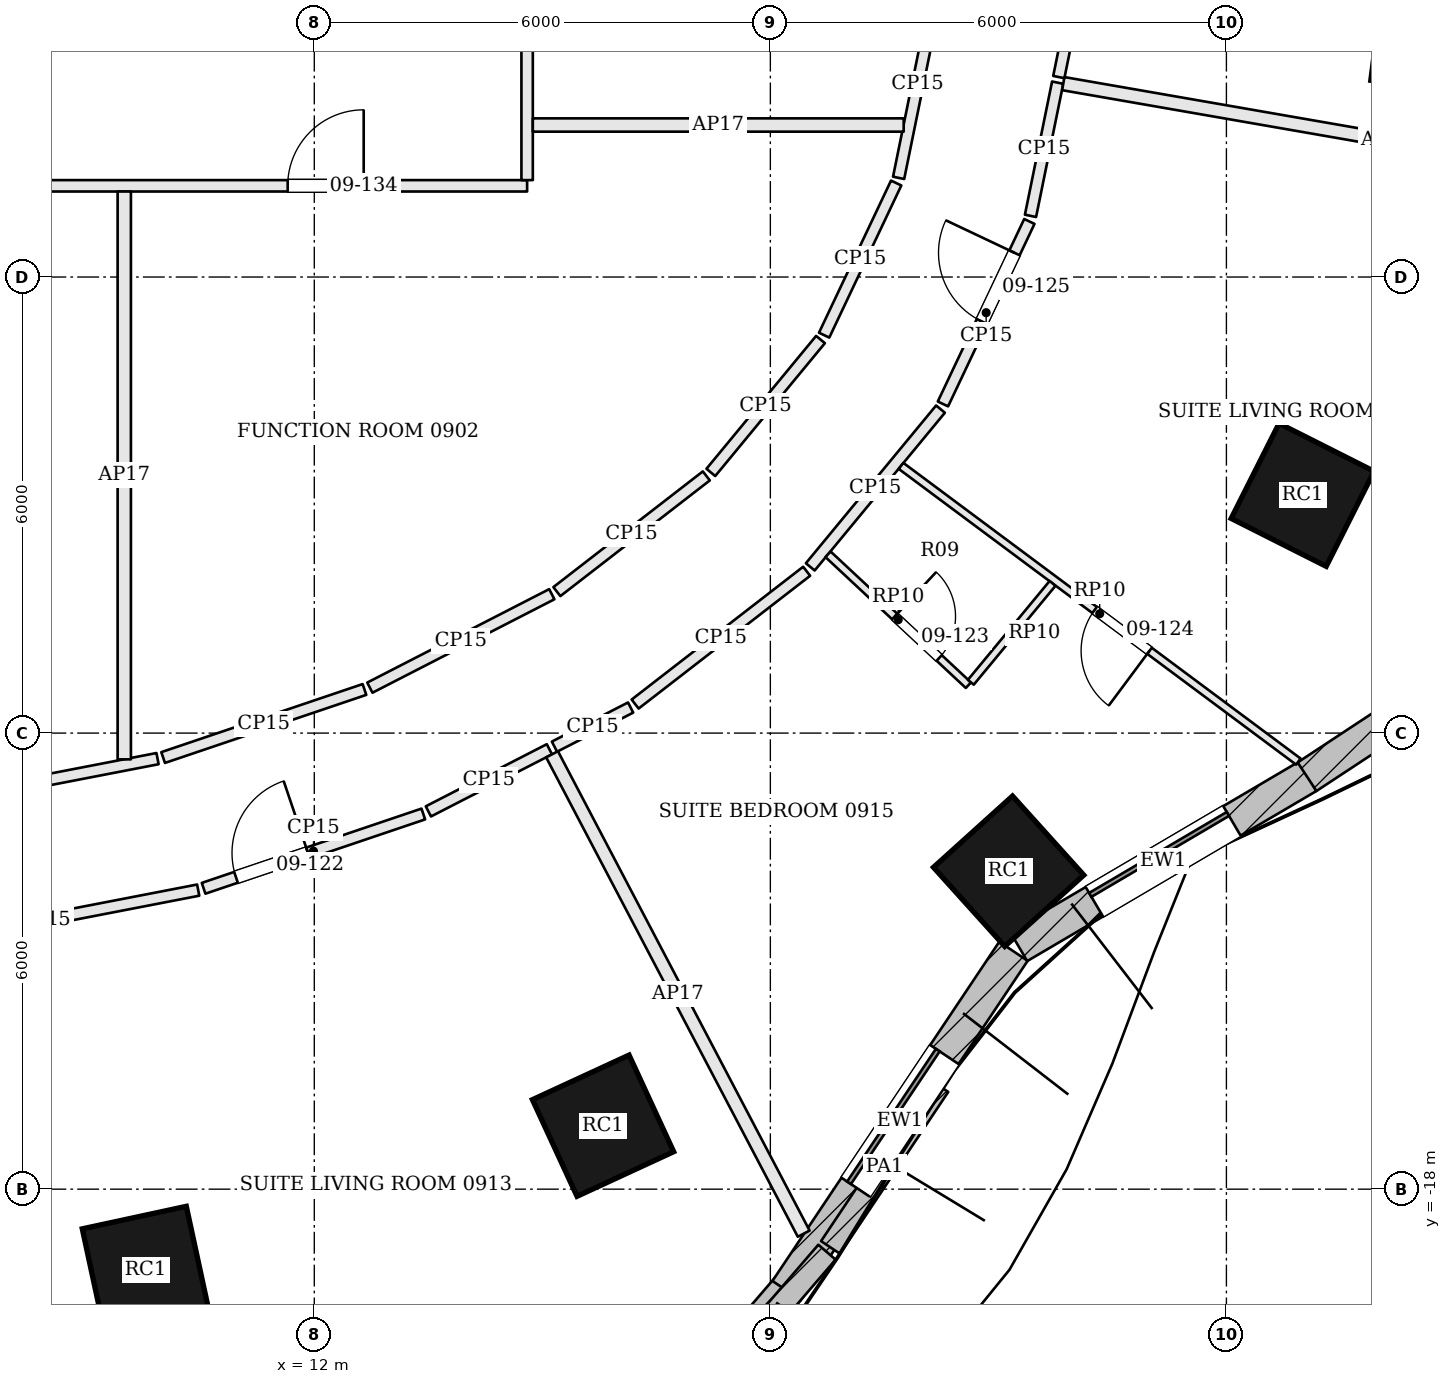
"""IFC4 building model, lengths in metres.
Left out: names, types, materials, properties, quantities, classifications, styles, units other than length and angle.
Written with IfcOpenShell. Run it as: python <this file> out.ifc"""

import sys

from ifc_helpers import new_model, si_unit, direction, frame, frame_2d, origin, origin_2d, place, context, subcontext, project, spatial, rectangle, extrude, element, fill, save


model = new_model("IFC4")
c1 = context("Model", 3, precision=1e-05, world=origin(), true_north=direction((0.0, 1.0)))
c2 = subcontext(c1, "Body", "Model", "MODEL_VIEW")
j1 = project(units=[si_unit("LENGTHUNIT", "METRE"), si_unit("PLANEANGLEUNIT", "RADIAN")], contexts=[c1])
p1 = place(None, origin())
s1 = spatial("IfcSite", under=j1, at=p1, CompositionType="ELEMENT")
p2 = place(p1, origin())
s2 = spatial("IfcBuilding", under=s1, at=p2, CompositionType="ELEMENT")
p3 = place(p2, frame((0.0, 0.0, 48.3)))
s3 = spatial("IfcBuildingStorey", under=s2, at=p3, CompositionType="ELEMENT", Elevation=48.3)
for number, where, z_axis, x_axis in (
    (1, (9.78, -19.058, 0.0), (0.0, 0.0, 1.0), (0.977, 0.211, 0.0)),
    (2, (15.799, -17.165, 0.0), (0.0, 0.0, 1.0), (0.908, 0.419, 0.0)),
    (3, (21.135, -13.817, 0.0), (0.0, 0.0, 1.0), (0.743, 0.67, 0.0)),
    (4, (25.003, -8.866, 0.0), (0.0, 0.0, 1.0), (0.45, 0.893, 0.0)),
    (5, (26.684, -2.808, 0.0), (0.0, 0.0, 1.0), (0.128, 0.992, 0.0)),
):
    element("IfcColumn", number, at=place(p3, frame(where, z_axis=z_axis, x_axis=x_axis)), inside=s3, PredefinedType="COLUMN", context=c2, shape_type="SweptSolid", body=[
        extrude(rectangle(XDim=1.4, YDim=1.4, at=origin_2d()), origin(), (0.0, 0.0, 1.0), 3.6),
    ])
p4 = place(p3, frame((15.919, -21.999, 0.0), z_axis=(0.0, 0.0, 1.0), x_axis=(0.652009971272, 0.758210391225, 0.0)))
e6 = element("IfcWall", 6, at=p4, inside=s3, PredefinedType="SOLIDWALL", context=c2, shape_type="SweptSolid", body=[
    extrude(rectangle(XDim=3.545, YDim=0.45, at=frame_2d((1.772, 0.0))), origin(), (0.0, 0.0, 1.0), 3.4),
])
p5 = place(p4, frame((0.722, 0.0, 0.9)))
e7 = element("IfcOpeningElement", 7, at=p5, cuts=e6, PredefinedType="OPENING", context=c2, shape_type="SweptSolid", body=[
    extrude(rectangle(XDim=2.1, YDim=2.0, at=frame_2d((1.05, 1.0))), frame((0.0, 0.235, 0.0), z_axis=(0.0, -1.0, 0.0), x_axis=(1.0, 0.0, 0.0)), (0.0, 0.0, 1.0), 0.47),
])
p6 = place(p3, frame((18.214, -19.333, 0.0), z_axis=(0.0, 0.0, 1.0), x_axis=(0.555833135316, 0.831293886471, 0.0)))
e8 = element("IfcWall", 8, at=p6, inside=s3, PredefinedType="SOLIDWALL", context=c2, shape_type="SweptSolid", body=[
    extrude(rectangle(XDim=5.368, YDim=0.45, at=frame_2d((2.684, 0.0))), origin(), (0.0, 0.0, 1.0), 3.4),
])
p7 = place(p6, frame((1.634, 0.0, 0.9)))
e9 = element("IfcOpeningElement", 9, at=p7, cuts=e8, PredefinedType="OPENING", context=c2, shape_type="SweptSolid", body=[
    extrude(rectangle(XDim=2.1, YDim=2.0, at=frame_2d((1.05, 1.0))), frame((0.0, 0.235, 0.0), z_axis=(0.0, -1.0, 0.0), x_axis=(1.0, 0.0, 0.0)), (0.0, 0.0, 1.0), 0.47),
])
p8 = place(p3, frame((21.266, -14.805, 0.0), z_axis=(0.0, 0.0, 1.0), x_axis=(0.861975457737, 0.506950007653, 0.0)))
e10 = element("IfcWall", 10, at=p8, inside=s3, PredefinedType="SOLIDWALL", context=c2, shape_type="SweptSolid", body=[
    extrude(rectangle(XDim=4.413, YDim=0.45, at=frame_2d((2.207, 0.0))), origin(), (0.0, 0.0, 1.0), 3.4),
])
p9 = place(p8, frame((1.156, 0.0, 0.9)))
e11 = element("IfcOpeningElement", 11, at=p9, cuts=e10, PredefinedType="OPENING", context=c2, shape_type="SweptSolid", body=[
    extrude(rectangle(XDim=2.1, YDim=2.0, at=frame_2d((1.05, 1.0))), frame((0.0, 0.235, 0.0), z_axis=(0.0, -1.0, 0.0), x_axis=(1.0, 0.0, 0.0)), (0.0, 0.0, 1.0), 0.47),
])
p10 = place(p3, frame((25.061, -12.574, 0.0), z_axis=(0.0, 0.0, 1.0), x_axis=(0.83520622102, 0.549936876714, 0.0)))
e12 = element("IfcWall", 12, at=p10, inside=s3, PredefinedType="SOLIDWALL", context=c2, shape_type="SweptSolid", body=[
    extrude(rectangle(XDim=5.57, YDim=0.45, at=frame_2d((2.785, 0.0))), origin(), (0.0, 0.0, 1.0), 3.4),
])
p11 = place(p10, frame((1.735, 0.0, 0.9)))
e13 = element("IfcOpeningElement", 13, at=p11, cuts=e12, PredefinedType="OPENING", context=c2, shape_type="SweptSolid", body=[
    extrude(rectangle(XDim=2.1, YDim=2.0, at=frame_2d((1.05, 1.0))), frame((0.0, 0.235, 0.0), z_axis=(0.0, -1.0, 0.0), x_axis=(1.0, 0.0, 0.0)), (0.0, 0.0, 1.0), 0.47),
])
p12 = place(p3, frame((18.076, -19.492, 0.0), z_axis=(0.0, 0.0, 1.0), x_axis=(0.822618823872, -0.568593238274, 0.0)))
e14 = element("IfcWall", 14, at=p12, inside=s3, PredefinedType="SOLIDWALL", context=c2, shape_type="SweptSolid", body=[
    extrude(rectangle(XDim=1.75, YDim=0.2, at=frame_2d((0.875, 0.0))), origin(), (0.0, 0.0, 1.0), 3.4),
])
p13 = place(p3, frame((16.056, -21.956, 3.6), z_axis=(0.0, 0.0, 1.0), x_axis=(0.652038588201, 0.75818578165, 0.0)))
e15 = element("IfcWall", 15, at=p13, inside=s3, PredefinedType="PARAPET", context=c2, shape_type="SweptSolid", body=[
    extrude(rectangle(XDim=4.124, YDim=0.3, at=frame_2d((2.062, 0.0))), origin(), (0.0, 0.0, 1.0), 1.1),
])
p14 = place(p3, frame((18.792, -18.767, 3.6), z_axis=(0.0, 0.0, 1.0), x_axis=(0.555843382853, 0.831287034507, 0.0)))
e16 = element("IfcWall", 16, at=p14, inside=s3, PredefinedType="PARAPET", context=c2, shape_type="SweptSolid", body=[
    extrude(rectangle(XDim=2.562, YDim=0.3, at=frame_2d((1.281, 0.0))), origin(), (0.0, 0.0, 1.0), 1.1),
])
p15 = place(p3, frame((6.43, -14.848, 0.0), z_axis=(0.0, 0.0, 1.0), x_axis=(0.981801609996, 0.189909448446, 0.0)))
e17 = element("IfcWall", 17, at=p15, inside=s3, PredefinedType="PARTITIONING", context=c2, shape_type="SweptSolid", body=[
    extrude(rectangle(XDim=4.118, YDim=0.15, at=frame_2d((2.059, 0.0))), origin(), (0.0, 0.0, 1.0), 2.68),
])
p16 = place(p3, frame((10.544, -14.042, 0.0), z_axis=(0.0, 0.0, 1.0), x_axis=(0.947314242069, 0.320305677085, 0.0)))
e18 = element("IfcWall", 18, at=p16, inside=s3, PredefinedType="PARTITIONING", context=c2, shape_type="SweptSolid", body=[
    extrude(rectangle(XDim=3.051, YDim=0.15, at=frame_2d((1.525, 0.0))), origin(), (0.0, 0.0, 1.0), 2.68),
])
p17 = place(p16, frame((0.45, 0.0, 0.0)))
e19 = element("IfcOpeningElement", 19, at=p17, cuts=e18, PredefinedType="OPENING", context=c2, shape_type="SweptSolid", body=[
    extrude(rectangle(XDim=1.0, YDim=2.1, at=frame_2d((0.5, 1.05))), frame((0.0, 0.085, 0.0), z_axis=(0.0, -1.0, 0.0), x_axis=(1.0, 0.0, 0.0)), (0.0, 0.0, 1.0), 0.17),
])
p18 = place(p3, frame((13.501, -13.03, 0.0), z_axis=(0.0, 0.0, 1.0), x_axis=(0.88960147572, 0.456737577168, 0.0)))
e20 = element("IfcWall", 20, at=p18, inside=s3, PredefinedType="PARTITIONING", context=c2, shape_type="SweptSolid", body=[
    extrude(rectangle(XDim=1.79, YDim=0.15, at=frame_2d((0.895, 0.0))), origin(), (0.0, 0.0, 1.0), 2.68),
])
p19 = place(p3, frame((18.439, -18.586, 0.0), z_axis=(0.0, 0.0, 1.0), x_axis=(-0.464812403085, 0.885409187855, 0.0)))
e21 = element("IfcWall", 21, at=p19, inside=s3, PredefinedType="PARTITIONING", context=c2, shape_type="SweptSolid", body=[
    extrude(rectangle(XDim=7.123, YDim=0.175, at=frame_2d((3.562, 0.0))), origin(), (0.0, 0.0, 1.0), 2.68),
])
p20 = place(p3, frame((15.16, -12.178, 0.0), z_axis=(0.0, 0.0, 1.0), x_axis=(0.889562255844, 0.456813958826, 0.0)))
e22 = element("IfcWall", 22, at=p20, inside=s3, PredefinedType="PARTITIONING", context=c2, shape_type="SweptSolid", body=[
    extrude(rectangle(XDim=1.126, YDim=0.15, at=frame_2d((0.563, 0.0))), origin(), (0.0, 0.0, 1.0), 2.68),
])
p21 = place(p3, frame((16.221, -11.618, 0.0), z_axis=(0.0, 0.0, 1.0), x_axis=(0.79075977513, 0.612126602948, 0.0)))
e23 = element("IfcWall", 23, at=p21, inside=s3, PredefinedType="PARTITIONING", context=c2, shape_type="SweptSolid", body=[
    extrude(rectangle(XDim=2.854, YDim=0.15, at=frame_2d((1.427, 0.0))), origin(), (0.0, 0.0, 1.0), 2.68),
])
p22 = place(p3, frame((18.525, -9.813, 0.0), z_axis=(0.0, 0.0, 1.0), x_axis=(0.636590727548, 0.771201818981, 0.0)))
e24 = element("IfcWall", 24, at=p22, inside=s3, PredefinedType="PARTITIONING", context=c2, shape_type="SweptSolid", body=[
    extrude(rectangle(XDim=2.691, YDim=0.15, at=frame_2d((1.346, 0.0))), origin(), (0.0, 0.0, 1.0), 2.68),
])
p23 = place(p3, frame((20.271, -7.67, 0.0), z_axis=(0.0, 0.0, 1.0), x_axis=(0.427995478521, 0.903780875193, 0.0)))
e25 = element("IfcWall", 25, at=p23, inside=s3, PredefinedType="PARTITIONING", context=c2, shape_type="SweptSolid", body=[
    extrude(rectangle(XDim=2.656, YDim=0.15, at=frame_2d((1.328, 0.0))), origin(), (0.0, 0.0, 1.0), 2.68),
])
p24 = place(p23, frame((1.2, 0.0, 0.0)))
e26 = element("IfcOpeningElement", 26, at=p24, cuts=e25, PredefinedType="OPENING", context=c2, shape_type="SweptSolid", body=[
    extrude(rectangle(XDim=1.0, YDim=2.1, at=frame_2d((0.5, 1.05))), frame((0.0, 0.085, 0.0), z_axis=(0.0, -1.0, 0.0), x_axis=(1.0, 0.0, 0.0)), (0.0, 0.0, 1.0), 0.17),
])
p25 = place(p3, frame((21.423, -5.195, 0.0), z_axis=(0.0, 0.0, 1.0), x_axis=(0.199711278169, 0.979854787901, 0.0)))
e27 = element("IfcWall", 27, at=p25, inside=s3, PredefinedType="PARTITIONING", context=c2, shape_type="SweptSolid", body=[
    extrude(rectangle(XDim=1.789, YDim=0.15, at=frame_2d((0.894, 0.0))), origin(), (0.0, 0.0, 1.0), 2.68),
])
p26 = place(p3, frame((30.366, -4.936, 0.0), z_axis=(0.0, 0.0, 1.0), x_axis=(-0.98521403611, 0.171328056817, 0.0)))
e28 = element("IfcWall", 28, at=p26, inside=s3, PredefinedType="PARTITIONING", context=c2, shape_type="SweptSolid", body=[
    extrude(rectangle(XDim=8.64, YDim=0.175, at=frame_2d((4.32, 0.0))), origin(), (0.0, 0.0, 1.0), 2.68),
])
p27 = place(p3, frame((21.795, -3.369, 0.0), z_axis=(0.0, 0.0, 1.0), x_axis=(0.199793439504, 0.979838038418, 0.0)))
e29 = element("IfcWall", 29, at=p27, inside=s3, PredefinedType="PARTITIONING", context=c2, shape_type="SweptSolid", body=[
    extrude(rectangle(XDim=1.034, YDim=0.15, at=frame_2d((0.517, 0.0))), origin(), (0.0, 0.0, 1.0), 2.68),
])
p28 = place(p3, frame((-14.725, -4.8, 0.0), z_axis=(0.0, 0.0, 1.0), x_axis=(1.0, 0.0, 0.0)))
e30 = element("IfcWall", 30, at=p28, inside=s3, PredefinedType="PARTITIONING", context=c2, shape_type="SweptSolid", body=[
    extrude(rectangle(XDim=29.525, YDim=0.15, at=frame_2d((14.763, 0.0))), origin(), (0.0, 0.0, 1.0), 2.68),
])
p29 = place(p28, frame((2.075, 0.0, 0.0)))
e31 = element("IfcOpeningElement", 31, at=p29, cuts=e30, PredefinedType="OPENING", context=c2, shape_type="SweptSolid", body=[
    extrude(rectangle(XDim=1.0, YDim=2.4, at=frame_2d((0.5, 1.2))), frame((0.0, 0.085, 0.0), z_axis=(0.0, -1.0, 0.0), x_axis=(1.0, 0.0, 0.0)), (0.0, 0.0, 1.0), 0.17),
])
p30 = place(p28, frame((13.825, 0.0, 0.0)))
e32 = element("IfcOpeningElement", 32, at=p30, cuts=e30, PredefinedType="OPENING", context=c2, shape_type="SweptSolid", body=[
    extrude(rectangle(XDim=1.8, YDim=2.1, at=frame_2d((0.9, 1.05))), frame((0.0, 0.085, 0.0), z_axis=(0.0, -1.0, 0.0), x_axis=(1.0, 0.0, 0.0)), (0.0, 0.0, 1.0), 0.17),
])
p31 = place(p28, frame((26.375, 0.0, 0.0)))
e33 = element("IfcOpeningElement", 33, at=p31, cuts=e30, PredefinedType="OPENING", context=c2, shape_type="SweptSolid", body=[
    extrude(rectangle(XDim=1.0, YDim=2.4, at=frame_2d((0.5, 1.2))), frame((0.0, 0.085, 0.0), z_axis=(0.0, -1.0, 0.0), x_axis=(1.0, 0.0, 0.0)), (0.0, 0.0, 1.0), 0.17),
])
p32 = place(p3, frame((14.8, -4.725, 0.0), z_axis=(0.0, 0.0, 1.0), x_axis=(0.0, 1.0, 0.0)))
e34 = element("IfcWall", 34, at=p32, inside=s3, PredefinedType="PARTITIONING", context=c2, shape_type="SweptSolid", body=[
    extrude(rectangle(XDim=15.008, YDim=0.15, at=frame_2d((7.504, 0.0))), origin(), (0.0, 0.0, 1.0), 2.68),
])
p33 = place(p32, frame((11.516, 0.0, 0.0)))
e35 = element("IfcOpeningElement", 35, at=p33, cuts=e34, PredefinedType="OPENING", context=c2, shape_type="SweptSolid", body=[
    extrude(rectangle(XDim=0.7, YDim=2.1, at=frame_2d((0.35, 1.05))), frame((0.0, 0.085, 0.0), z_axis=(0.0, -1.0, 0.0), x_axis=(1.0, 0.0, 0.0)), (0.0, 0.0, 1.0), 0.17),
])
p34 = place(p32, frame((4.225, 0.0, 0.0)))
e36 = element("IfcOpeningElement", 36, at=p34, cuts=e34, PredefinedType="OPENING", context=c2, shape_type="SweptSolid", body=[
    extrude(rectangle(XDim=1.0, YDim=2.1, at=frame_2d((0.5, 1.05))), frame((0.0, 0.085, 0.0), z_axis=(0.0, -1.0, 0.0), x_axis=(1.0, 0.0, 0.0)), (0.0, 0.0, 1.0), 0.17),
])
p35 = place(p3, frame((20.19, -2.229, 0.0), z_axis=(0.0, 0.0, 1.0), x_axis=(-0.199752828647, -0.97984631828, 0.0)))
e37 = element("IfcWall", 37, at=p35, inside=s3, PredefinedType="PARTITIONING", context=c2, shape_type="SweptSolid", body=[
    extrude(rectangle(XDim=2.517, YDim=0.15, at=frame_2d((1.258, 0.0))), origin(), (0.0, 0.0, 1.0), 2.68),
])
p36 = place(p3, frame((19.655, -4.763, 0.0), z_axis=(0.0, 0.0, 1.0), x_axis=(-0.427972604023, -0.903791707312, 0.0)))
e38 = element("IfcWall", 38, at=p36, inside=s3, PredefinedType="PARTITIONING", context=c2, shape_type="SweptSolid", body=[
    extrude(rectangle(XDim=2.215, YDim=0.15, at=frame_2d((1.107, 0.0))), origin(), (0.0, 0.0, 1.0), 2.68),
])
p37 = place(p3, frame((18.66, -6.823, 0.0), z_axis=(0.0, 0.0, 1.0), x_axis=(-0.636575205534, -0.771214631409, 0.0)))
e39 = element("IfcWall", 39, at=p37, inside=s3, PredefinedType="PARTITIONING", context=c2, shape_type="SweptSolid", body=[
    extrude(rectangle(XDim=2.267, YDim=0.15, at=frame_2d((1.133, 0.0))), origin(), (0.0, 0.0, 1.0), 2.68),
])
p38 = place(p3, frame((17.158, -8.616, 0.0), z_axis=(0.0, 0.0, 1.0), x_axis=(-0.790740570998, -0.612151410501, 0.0)))
e40 = element("IfcWall", 40, at=p38, inside=s3, PredefinedType="PARTITIONING", context=c2, shape_type="SweptSolid", body=[
    extrude(rectangle(XDim=2.487, YDim=0.15, at=frame_2d((1.243, 0.0))), origin(), (0.0, 0.0, 1.0), 2.68),
])
p39 = place(p3, frame((15.125, -10.173, 0.0), z_axis=(0.0, 0.0, 1.0), x_axis=(-0.889567018144, -0.456804684993, 0.0)))
e41 = element("IfcWall", 41, at=p39, inside=s3, PredefinedType="PARTITIONING", context=c2, shape_type="SweptSolid", body=[
    extrude(rectangle(XDim=2.691, YDim=0.15, at=frame_2d((1.345, 0.0))), origin(), (0.0, 0.0, 1.0), 2.68),
])
p40 = place(p3, frame((12.66, -11.426, 0.0), z_axis=(0.0, 0.0, 1.0), x_axis=(-0.94731220982, -0.320311687465, 0.0)))
e42 = element("IfcWall", 42, at=p40, inside=s3, PredefinedType="PARTITIONING", context=c2, shape_type="SweptSolid", body=[
    extrude(rectangle(XDim=2.796, YDim=0.15, at=frame_2d((1.398, 0.0))), origin(), (0.0, 0.0, 1.0), 2.68),
])
p41 = place(p3, frame((9.938, -12.336, 0.0), z_axis=(0.0, 0.0, 1.0), x_axis=(-0.981799909949, -0.18991823721, 0.0)))
e43 = element("IfcWall", 43, at=p41, inside=s3, PredefinedType="PARTITIONING", context=c2, shape_type="SweptSolid", body=[
    extrude(rectangle(XDim=3.881, YDim=0.15, at=frame_2d((1.94, 0.0))), origin(), (0.0, 0.0, 1.0), 2.68),
])
p42 = place(p3, frame((24.946, -12.375, 0.0), z_axis=(0.0, 0.0, 1.0), x_axis=(-0.802211102923, 0.597040489705, 0.0)))
e44 = element("IfcWall", 44, at=p42, inside=s3, PredefinedType="PARTITIONING", context=c2, shape_type="SweptSolid", body=[
    extrude(rectangle(XDim=6.516, YDim=0.1, at=frame_2d((3.258, 0.0))), origin(), (0.0, 0.0, 1.0), 2.934),
])
p43 = place(p42, frame((2.441, 0.0, 0.0)))
e45 = element("IfcOpeningElement", 45, at=p43, cuts=e44, PredefinedType="OPENING", context=c2, shape_type="SweptSolid", body=[
    extrude(rectangle(XDim=0.9, YDim=2.4, at=frame_2d((0.45, 1.2))), frame((0.0, 0.06, 0.0), z_axis=(0.0, -1.0, 0.0), x_axis=(1.0, 0.0, 0.0)), (0.0, 0.0, 1.0), 0.12),
])
p44 = place(p3, frame((18.759, -9.648, 0.0), z_axis=(0.0, 0.0, 1.0), x_axis=(0.731331715945, -0.682021936049, 0.0)))
e46 = element("IfcWall", 46, at=p44, inside=s3, PredefinedType="PARTITIONING", context=c2, shape_type="SweptSolid", body=[
    extrude(rectangle(XDim=2.525, YDim=0.1, at=frame_2d((1.263, 0.0))), origin(), (0.0, 0.0, 1.0), 2.934),
])
p45 = place(p44, frame((1.2, 0.0, 0.0)))
e47 = element("IfcOpeningElement", 47, at=p45, cuts=e46, PredefinedType="OPENING", context=c2, shape_type="SweptSolid", body=[
    extrude(rectangle(XDim=0.8, YDim=2.1, at=frame_2d((0.4, 1.05))), frame((0.0, 0.06, 0.0), z_axis=(0.0, -1.0, 0.0), x_axis=(1.0, 0.0, 0.0)), (0.0, 0.0, 1.0), 0.12),
])
p46 = place(p3, frame((20.637, -11.331, 0.0), z_axis=(0.0, 0.0, 1.0), x_axis=(0.637105732439, 0.770776417447, 0.0)))
e48 = element("IfcWall", 48, at=p46, inside=s3, PredefinedType="PARTITIONING", context=c2, shape_type="SweptSolid", body=[
    extrude(rectangle(XDim=1.688, YDim=0.1, at=frame_2d((0.844, 0.0))), origin(), (0.0, 0.0, 1.0), 2.934),
])
p47 = place(p3, frame((9.5, -12.345, 0.0), z_axis=(0.0, 0.0, 1.0), x_axis=(0.0, 1.0, 0.0)))
e49 = element("IfcWall", 49, at=p47, inside=s3, PredefinedType="PARTITIONING", context=c2, shape_type="SweptSolid", body=[
    extrude(rectangle(XDim=7.47, YDim=0.175, at=frame_2d((3.735, 0.0))), origin(), (0.0, 0.0, 1.0), 2.68),
])
p48 = place(p3, frame((14.875, -4.0, 0.0), z_axis=(0.0, 0.0, 1.0), x_axis=(1.0, 0.0, 0.0)))
e50 = element("IfcWall", 50, at=p48, inside=s3, PredefinedType="PARTITIONING", context=c2, shape_type="SweptSolid", body=[
    extrude(rectangle(XDim=4.879, YDim=0.175, at=frame_2d((2.439, 0.0))), origin(), (0.0, 0.0, 1.0), 2.68),
])
p49 = place(p7, origin())
e51 = element("IfcWindow", 51, at=p49, inside=s3, PartitioningType="SINGLE_PANEL", PredefinedType="WINDOW", context=c2, shape_type="SweptSolid", body=[
    extrude(rectangle(XDim=2.1, YDim=2.0, at=frame_2d((1.05, 1.0))), frame((0.0, 0.135, 0.0), z_axis=(0.0, -1.0, 0.0), x_axis=(1.0, 0.0, 0.0)), (0.0, 0.0, 1.0), 0.06),
])
fill(e9, e51)
p50 = place(p9, origin())
e52 = element("IfcWindow", 52, at=p50, inside=s3, PartitioningType="SINGLE_PANEL", PredefinedType="WINDOW", context=c2, shape_type="SweptSolid", body=[
    extrude(rectangle(XDim=2.1, YDim=2.0, at=frame_2d((1.05, 1.0))), frame((0.0, 0.135, 0.0), z_axis=(0.0, -1.0, 0.0), x_axis=(1.0, 0.0, 0.0)), (0.0, 0.0, 1.0), 0.06),
])
fill(e11, e52)
p51 = place(p17, origin())
e53 = element("IfcDoor", 53, at=p51, inside=s3, OperationType="SINGLE_SWING_RIGHT", PredefinedType="DOOR", context=c2, shape_type="SweptSolid", body=[
    extrude(rectangle(XDim=1.0, YDim=2.1, at=frame_2d((0.5, 1.05))), frame((0.0, 0.025, 0.0), z_axis=(0.0, -1.0, 0.0), x_axis=(1.0, 0.0, 0.0)), (0.0, 0.0, 1.0), 0.05),
])
fill(e19, e53)
p52 = place(p45, origin())
e54 = element("IfcDoor", 54, at=p52, inside=s3, OperationType="SINGLE_SWING_LEFT", PredefinedType="DOOR", context=c2, shape_type="SweptSolid", body=[
    extrude(rectangle(XDim=0.8, YDim=2.1, at=frame_2d((0.4, 1.05))), frame((0.0, 0.025, 0.0), z_axis=(0.0, -1.0, 0.0), x_axis=(1.0, 0.0, 0.0)), (0.0, 0.0, 1.0), 0.05),
])
fill(e47, e54)
p53 = place(p43, origin())
e55 = element("IfcDoor", 55, at=p53, inside=s3, OperationType="SINGLE_SWING_LEFT", PredefinedType="DOOR", context=c2, shape_type="SweptSolid", body=[
    extrude(rectangle(XDim=0.9, YDim=2.4, at=frame_2d((0.45, 1.2))), frame((0.0, 0.025, 0.0), z_axis=(0.0, -1.0, 0.0), x_axis=(1.0, 0.0, 0.0)), (0.0, 0.0, 1.0), 0.05),
])
fill(e45, e55)
p54 = place(p24, origin())
e56 = element("IfcDoor", 56, at=p54, inside=s3, OperationType="SINGLE_SWING_RIGHT", PredefinedType="DOOR", context=c2, shape_type="SweptSolid", body=[
    extrude(rectangle(XDim=1.0, YDim=2.1, at=frame_2d((0.5, 1.05))), frame((0.0, 0.025, 0.0), z_axis=(0.0, -1.0, 0.0), x_axis=(1.0, 0.0, 0.0)), (0.0, 0.0, 1.0), 0.05),
])
fill(e26, e56)
p55 = place(p31, origin())
e57 = element("IfcDoor", 57, at=p55, inside=s3, OperationType="SINGLE_SWING_RIGHT", PredefinedType="DOOR", context=c2, shape_type="SweptSolid", body=[
    extrude(rectangle(XDim=1.0, YDim=2.4, at=frame_2d((0.5, 1.2))), frame((0.0, 0.025, 0.0), z_axis=(0.0, -1.0, 0.0), x_axis=(1.0, 0.0, 0.0)), (0.0, 0.0, 1.0), 0.05),
])
fill(e33, e57)
save(model, sys.argv[1])
